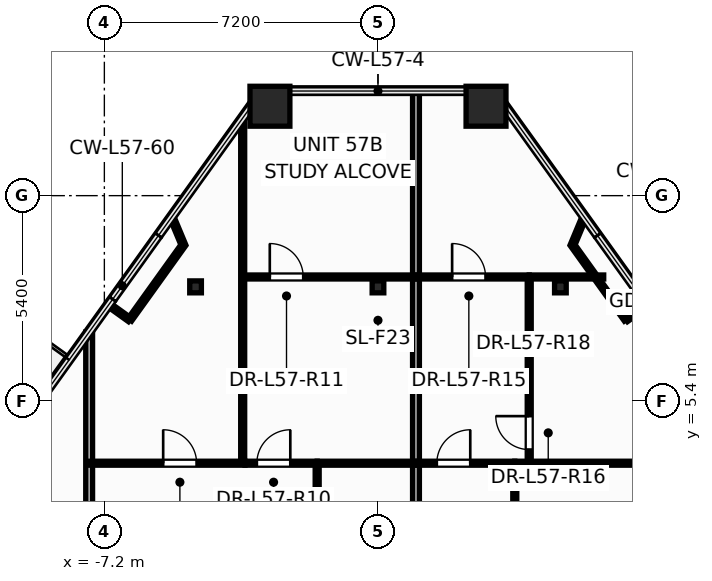
"""IFC4 building model, lengths in metres.
Left out: names, types, materials, properties, quantities, classifications, styles, units other than length and angle.
Written with IfcOpenShell. Run it as: python <this file> out.ifc"""

import sys

from ifc_helpers import new_model, si_unit, direction, frame, frame_2d, origin, origin_2d, place, context, subcontext, project, spatial, rectangle, hollow_rectangle, i_section, extrude, element, fill, save


model = new_model("IFC4")
c1 = context("Model", 3, precision=1e-05, world=origin(), true_north=direction((0.0, 1.0)))
c2 = subcontext(c1, "Body", "Model", "MODEL_VIEW")
j1 = project(units=[si_unit("LENGTHUNIT", "METRE"), si_unit("PLANEANGLEUNIT", "RADIAN")], contexts=[c1])
p1 = place(None, origin())
s1 = spatial("IfcSite", under=j1, at=p1, CompositionType="ELEMENT")
p2 = place(p1, origin())
s2 = spatial("IfcBuilding", under=s1, at=p2, CompositionType="ELEMENT")
p3 = place(p2, frame((0.0, 0.0, 218.1)))
s3 = spatial("IfcBuildingStorey", under=s2, at=p3, CompositionType="ELEMENT", Elevation=218.1)
for number, where, z_axis, x_axis in (
    (1, (2.843, 13.153, 0.0), (0.0, 0.0, 1.0), (1.0, 0.0, 0.0)),
    (2, (-2.843, 13.153, 0.0), (0.0, 0.0, 1.0), (1.0, 0.0, 0.0)),
):
    element("IfcColumn", number, at=place(p3, frame(where, z_axis=z_axis, x_axis=x_axis)), inside=s3, PredefinedType="COLUMN", context=c2, shape_type="SweptSolid", body=[
        extrude(hollow_rectangle(XDim=1.05, YDim=1.05, WallThickness=0.045, at=origin_2d()), origin(), (0.0, 0.0, 1.0), 3.6),
    ])
for number, where, z_axis, x_axis in (
    (3, (-4.8, 8.4, 0.0), (0.0, 0.0, 1.0), (1.0, 0.0, 0.0)),
    (4, (0.0, 8.4, 0.0), (0.0, 0.0, 1.0), (1.0, 0.0, 0.0)),
    (5, (4.8, 8.4, 0.0), (0.0, 0.0, 1.0), (1.0, 0.0, 0.0)),
):
    element("IfcColumn", number, at=place(p3, frame(where, z_axis=z_axis, x_axis=x_axis)), inside=s3, PredefinedType="COLUMN", context=c2, shape_type="SweptSolid", body=[
        extrude(i_section(OverallWidth=0.307, OverallDepth=0.314, WebThickness=0.012, FlangeThickness=0.019, at=origin_2d()), origin(), (0.0, 0.0, 1.0), 3.6),
    ])
p4 = place(p3, frame((-7.6, -2.76, 0.0), z_axis=(0.0, 0.0, 1.0), x_axis=(0.0, 1.0, 0.0)))
e6 = element("IfcWall", 6, at=p4, inside=s3, PredefinedType="PARTITIONING", context=c2, shape_type="SweptSolid", body=[
    extrude(rectangle(XDim=9.972, YDim=0.18, at=frame_2d((4.986, 0.0))), origin(), (0.0, 0.0, 1.0), 2.62),
])
p5 = place(p3, frame((-3.56, 3.76, 0.0), z_axis=(0.0, 0.0, 1.0), x_axis=(0.0, 1.0, 0.0)))
e7 = element("IfcWall", 7, at=p5, inside=s3, PredefinedType="PARTITIONING", context=c2, shape_type="SweptSolid", body=[
    extrude(rectangle(XDim=9.08, YDim=0.105, at=frame_2d((4.54, 0.0))), origin(), (0.0, 0.0, 1.0), 2.62),
])
p6 = place(p3, frame((1.0, -2.76, 0.0), z_axis=(0.0, 0.0, 1.0), x_axis=(0.0, 1.0, 0.0)))
e8 = element("IfcWall", 8, at=p6, inside=s3, PredefinedType="PARTITIONING", context=c2, shape_type="SweptSolid", body=[
    extrude(rectangle(XDim=16.313, YDim=0.18, at=frame_2d((8.156, 0.0))), origin(), (0.0, 0.0, 1.0), 2.32),
])
p7 = place(p3, frame((3.98, 3.76, 0.0), z_axis=(0.0, 0.0, 1.0), x_axis=(0.0, 1.0, 0.0)))
e9 = element("IfcWall", 9, at=p7, inside=s3, PredefinedType="PARTITIONING", context=c2, shape_type="SweptSolid", body=[
    extrude(rectangle(XDim=4.9, YDim=0.105, at=frame_2d((2.45, 0.0))), origin(), (0.0, 0.0, 1.0), 2.62),
])
p8 = place(p7, frame((0.359, 0.0, 0.0)))
e10 = element("IfcOpeningElement", 10, at=p8, cuts=e9, PredefinedType="OPENING", context=c2, shape_type="SweptSolid", body=[
    extrude(rectangle(XDim=0.886, YDim=2.104, at=frame_2d((0.44, 1.052))), frame((0.0, 0.062, 0.0), z_axis=(0.0, -1.0, 0.0), x_axis=(1.0, 0.0, 0.0)), (0.0, 0.0, 1.0), 0.125),
])
p9 = place(p3, frame((-3.56, 8.66, 0.0), z_axis=(0.0, 0.0, 1.0), x_axis=(1.0, 0.0, 0.0)))
e11 = element("IfcWall", 11, at=p9, inside=s3, PredefinedType="PARTITIONING", context=c2, shape_type="SweptSolid", body=[
    extrude(rectangle(XDim=4.56, YDim=0.105, at=frame_2d((2.28, 0.0))), origin(), (0.0, 0.0, 1.0), 3.345),
])
p10 = place(p9, frame((0.713, 0.0, 0.0)))
e12 = element("IfcOpeningElement", 12, at=p10, cuts=e11, PredefinedType="OPENING", context=c2, shape_type="SweptSolid", body=[
    extrude(rectangle(XDim=0.886, YDim=2.104, at=frame_2d((0.44, 1.052))), frame((0.0, 0.062, 0.0), z_axis=(0.0, -1.0, 0.0), x_axis=(1.0, 0.0, 0.0)), (0.0, 0.0, 1.0), 0.125),
])
p11 = place(p3, frame((-7.6, 3.76, 0.0), z_axis=(0.0, 0.0, 1.0), x_axis=(1.0, 0.0, 0.0)))
e13 = element("IfcWall", 13, at=p11, inside=s3, PredefinedType="PARTITIONING", context=c2, shape_type="SweptSolid", body=[
    extrude(rectangle(XDim=4.1, YDim=0.105, at=frame_2d((2.05, 0.0))), origin(), (0.0, 0.0, 1.0), 2.62),
])
p12 = place(p11, frame((1.948, 0.0, 0.0)))
e14 = element("IfcOpeningElement", 14, at=p12, cuts=e13, PredefinedType="OPENING", context=c2, shape_type="SweptSolid", body=[
    extrude(rectangle(XDim=0.886, YDim=2.104, at=frame_2d((0.44, 1.052))), frame((0.0, 0.062, 0.0), z_axis=(0.0, -1.0, 0.0), x_axis=(1.0, 0.0, 0.0)), (0.0, 0.0, 1.0), 0.125),
])
p13 = place(p3, frame((-1.6, 0.16, 0.0), z_axis=(0.0, 0.0, 1.0), x_axis=(0.0, 1.0, 0.0)))
e15 = element("IfcWall", 15, at=p13, inside=s3, PredefinedType="PARTITIONING", context=c2, shape_type="SweptSolid", body=[
    extrude(rectangle(XDim=3.6, YDim=0.105, at=frame_2d((1.8, 0.0))), origin(), (0.0, 0.0, 1.0), 2.32),
])
p14 = place(p13, frame((0.36, 0.0, 0.0)))
e16 = element("IfcOpeningElement", 16, at=p14, cuts=e15, PredefinedType="OPENING", context=c2, shape_type="SweptSolid", body=[
    extrude(rectangle(XDim=0.886, YDim=2.104, at=frame_2d((0.44, 1.052))), frame((0.0, 0.062, 0.0), z_axis=(0.0, -1.0, 0.0), x_axis=(1.0, 0.0, 0.0)), (0.0, 0.0, 1.0), 0.125),
])
p15 = place(p3, frame((3.6, 0.16, 0.0), z_axis=(0.0, 0.0, 1.0), x_axis=(0.0, 1.0, 0.0)))
e17 = element("IfcWall", 17, at=p15, inside=s3, PredefinedType="PARTITIONING", context=c2, shape_type="SweptSolid", body=[
    extrude(rectangle(XDim=3.6, YDim=0.105, at=frame_2d((1.8, 0.0))), origin(), (0.0, 0.0, 1.0), 2.32),
])
p16 = place(p15, frame((0.36, 0.0, 0.0)))
e18 = element("IfcOpeningElement", 18, at=p16, cuts=e17, PredefinedType="OPENING", context=c2, shape_type="SweptSolid", body=[
    extrude(rectangle(XDim=0.886, YDim=2.104, at=frame_2d((0.44, 1.052))), frame((0.0, 0.062, 0.0), z_axis=(0.0, -1.0, 0.0), x_axis=(1.0, 0.0, 0.0)), (0.0, 0.0, 1.0), 0.125),
])
p17 = place(p3, frame((3.6, 3.76, 0.0), z_axis=(0.0, 0.0, 1.0), x_axis=(1.0, 0.0, 0.0)))
e19 = element("IfcWall", 19, at=p17, inside=s3, PredefinedType="PARTITIONING", context=c2, shape_type="SweptSolid", body=[
    extrude(rectangle(XDim=3.88, YDim=0.105, at=frame_2d((1.94, 0.0))), origin(), (0.0, 0.0, 1.0), 2.62),
])
p18 = place(p3, frame((1.0, 8.66, 0.0), z_axis=(0.0, 0.0, 1.0), x_axis=(1.0, 0.0, 0.0)))
e20 = element("IfcWall", 20, at=p18, inside=s3, PredefinedType="PARTITIONING", context=c2, shape_type="SweptSolid", body=[
    extrude(rectangle(XDim=2.98, YDim=0.105, at=frame_2d((1.49, 0.0))), origin(), (0.0, 0.0, 1.0), 3.345),
])
p19 = place(p18, frame((0.951, 0.0, 0.0)))
e21 = element("IfcOpeningElement", 21, at=p19, cuts=e20, PredefinedType="OPENING", context=c2, shape_type="SweptSolid", body=[
    extrude(rectangle(XDim=0.886, YDim=2.104, at=frame_2d((0.44, 1.052))), frame((0.0, 0.062, 0.0), z_axis=(0.0, -1.0, 0.0), x_axis=(1.0, 0.0, 0.0)), (0.0, 0.0, 1.0), 0.125),
])
p20 = place(p3, frame((-1.6, 3.76, 0.0), z_axis=(0.0, 0.0, 1.0), x_axis=(1.0, 0.0, 0.0)))
e22 = element("IfcWall", 22, at=p20, inside=s3, PredefinedType="PARTITIONING", context=c2, shape_type="SweptSolid", body=[
    extrude(rectangle(XDim=2.6, YDim=0.105, at=frame_2d((1.3, 0.0))), origin(), (0.0, 0.0, 1.0), 2.32),
])
p21 = place(p3, frame((1.0, 3.76, 0.0), z_axis=(0.0, 0.0, 1.0), x_axis=(1.0, 0.0, 0.0)))
e23 = element("IfcWall", 23, at=p21, inside=s3, PredefinedType="PARTITIONING", context=c2, shape_type="SweptSolid", body=[
    extrude(rectangle(XDim=2.6, YDim=0.105, at=frame_2d((1.3, 0.0))), origin(), (0.0, 0.0, 1.0), 2.964),
])
p22 = place(p21, frame((0.548, 0.0, 0.0)))
e24 = element("IfcOpeningElement", 24, at=p22, cuts=e23, PredefinedType="OPENING", context=c2, shape_type="SweptSolid", body=[
    extrude(rectangle(XDim=0.886, YDim=2.104, at=frame_2d((0.44, 1.052))), frame((0.0, 0.062, 0.0), z_axis=(0.0, -1.0, 0.0), x_axis=(1.0, 0.0, 0.0)), (0.0, 0.0, 1.0), 0.125),
])
for number, where, z_axis, x_axis in (
    (25, (-5.12, 9.501, 0.0), (0.0, 0.0, 1.0), (-0.583, -0.812, 0.0)),
    (26, (6.531, 7.534, 0.0), (0.0, 0.0, 1.0), (-0.583, 0.812, 0.0)),
):
    element("IfcWall", number, at=place(p3, frame(where, z_axis=z_axis, x_axis=x_axis)), inside=s3, PredefinedType="PARTITIONING", context=c2, shape_type="SweptSolid", body=[
        extrude(rectangle(XDim=2.421, YDim=0.12, at=frame_2d((1.21, 0.0))), origin(), (0.0, 0.0, 1.0), 3.345),
    ])
p23 = place(p3, frame((-3.498, 3.76, 0.0), z_axis=(0.0, 0.0, 1.0), x_axis=(1.0, 0.0, 0.0)))
e27 = element("IfcWall", 27, at=p23, inside=s3, PredefinedType="PARTITIONING", context=c2, shape_type="SweptSolid", body=[
    extrude(rectangle(XDim=1.898, YDim=0.105, at=frame_2d((0.949, 0.0))), origin(), (0.0, 0.0, 1.0), 2.964),
])
p24 = place(p23, frame((0.311, 0.0, 0.0)))
e28 = element("IfcOpeningElement", 28, at=p24, cuts=e27, PredefinedType="OPENING", context=c2, shape_type="SweptSolid", body=[
    extrude(rectangle(XDim=0.886, YDim=2.104, at=frame_2d((0.44, 1.052))), frame((0.0, 0.062, 0.0), z_axis=(0.0, -1.0, 0.0), x_axis=(1.0, 0.0, 0.0)), (0.0, 0.0, 1.0), 0.125),
])
p25 = place(p3, frame((3.98, 8.66, 0.0), z_axis=(0.0, 0.0, 1.0), x_axis=(1.0, 0.0, 0.0)))
e29 = element("IfcWall", 29, at=p25, inside=s3, PredefinedType="PARTITIONING", context=c2, shape_type="SweptSolid", body=[
    extrude(rectangle(XDim=1.96, YDim=0.105, at=frame_2d((0.98, 0.0))), origin(), (0.0, 0.0, 1.0), 2.62),
])
for number, where, z_axis, x_axis in (
    (30, (-5.423, 10.227, 0.0), (0.0, 0.0, 1.0), (0.386, -0.923, 0.0)),
    (31, (5.12, 9.501, 0.0), (0.0, 0.0, 1.0), (0.386, 0.923, 0.0)),
):
    element("IfcWall", number, at=place(p3, frame(where, z_axis=z_axis, x_axis=x_axis)), inside=s3, PredefinedType="PARTITIONING", context=c2, shape_type="SweptSolid", body=[
        extrude(rectangle(XDim=0.787, YDim=0.12, at=frame_2d((0.394, 0.0))), origin(), (0.0, 0.0, 1.0), 2.863),
    ])
for number, where, z_axis, x_axis in (
    (32, (-6.531, 7.534, 0.0), (0.0, 0.0, 1.0), (-0.812, 0.583, 0.0)),
    (33, (7.076, 7.925, 0.0), (0.0, 0.0, 1.0), (-0.812, -0.583, 0.0)),
):
    element("IfcWall", number, at=place(p3, frame(where, z_axis=z_axis, x_axis=x_axis)), inside=s3, PredefinedType="PARTITIONING", context=c2, shape_type="SweptSolid", body=[
        extrude(rectangle(XDim=0.67, YDim=0.12, at=frame_2d((0.335, 0.0))), origin(), (0.0, 0.0, 1.0), 2.863),
    ])
p26 = place(p12, origin())
e34 = element("IfcDoor", 34, at=p26, inside=s3, OperationType="SINGLE_SWING_LEFT", PredefinedType="DOOR", context=c2, shape_type="SweptSolid", body=[
    extrude(rectangle(XDim=0.88, YDim=2.1, at=frame_2d((0.44, 1.05))), frame((0.0, 0.025, 0.0), z_axis=(0.0, -1.0, 0.0), x_axis=(1.0, 0.0, 0.0)), (0.0, 0.0, 1.0), 0.05),
])
fill(e14, e34)
p27 = place(p24, origin())
e35 = element("IfcDoor", 35, at=p27, inside=s3, OperationType="SINGLE_SWING_RIGHT", PredefinedType="DOOR", context=c2, shape_type="SweptSolid", body=[
    extrude(rectangle(XDim=0.88, YDim=2.1, at=frame_2d((0.44, 1.05))), frame((0.0, 0.025, 0.0), z_axis=(0.0, -1.0, 0.0), x_axis=(1.0, 0.0, 0.0)), (0.0, 0.0, 1.0), 0.05),
])
fill(e28, e35)
p28 = place(p10, origin())
e36 = element("IfcDoor", 36, at=p28, inside=s3, OperationType="SINGLE_SWING_LEFT", PredefinedType="DOOR", context=c2, shape_type="SweptSolid", body=[
    extrude(rectangle(XDim=0.88, YDim=2.1, at=frame_2d((0.44, 1.05))), frame((0.0, 0.025, 0.0), z_axis=(0.0, -1.0, 0.0), x_axis=(1.0, 0.0, 0.0)), (0.0, 0.0, 1.0), 0.05),
])
fill(e12, e36)
p29 = place(p19, origin())
e37 = element("IfcDoor", 37, at=p29, inside=s3, OperationType="SINGLE_SWING_LEFT", PredefinedType="DOOR", context=c2, shape_type="SweptSolid", body=[
    extrude(rectangle(XDim=0.88, YDim=2.1, at=frame_2d((0.44, 1.05))), frame((0.0, 0.025, 0.0), z_axis=(0.0, -1.0, 0.0), x_axis=(1.0, 0.0, 0.0)), (0.0, 0.0, 1.0), 0.05),
])
fill(e21, e37)
p30 = place(p8, origin())
e38 = element("IfcDoor", 38, at=p30, inside=s3, OperationType="SINGLE_SWING_RIGHT", PredefinedType="DOOR", context=c2, shape_type="SweptSolid", body=[
    extrude(rectangle(XDim=0.88, YDim=2.1, at=frame_2d((0.44, 1.05))), frame((0.0, 0.025, 0.0), z_axis=(0.0, -1.0, 0.0), x_axis=(1.0, 0.0, 0.0)), (0.0, 0.0, 1.0), 0.05),
])
fill(e10, e38)
p31 = place(p22, origin())
e39 = element("IfcDoor", 39, at=p31, inside=s3, OperationType="SINGLE_SWING_RIGHT", PredefinedType="DOOR", context=c2, shape_type="SweptSolid", body=[
    extrude(rectangle(XDim=0.88, YDim=2.1, at=frame_2d((0.44, 1.05))), frame((0.0, 0.025, 0.0), z_axis=(0.0, -1.0, 0.0), x_axis=(1.0, 0.0, 0.0)), (0.0, 0.0, 1.0), 0.05),
])
fill(e24, e39)
save(model, sys.argv[1])
